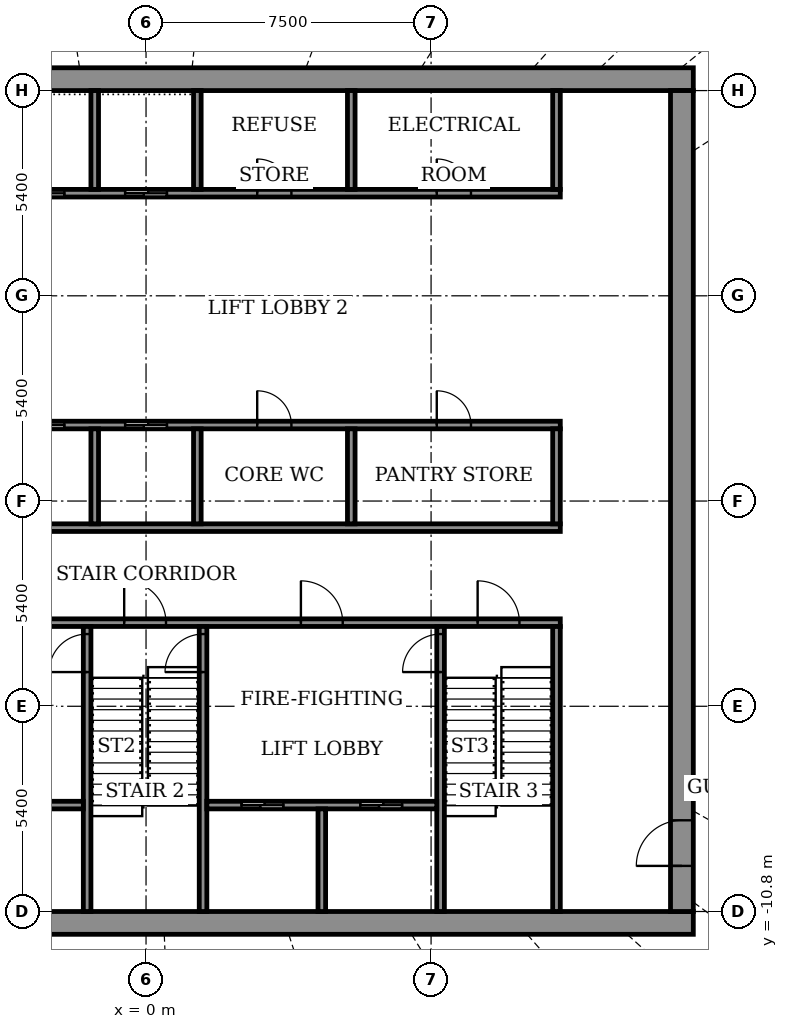
"""IFC4 building model, lengths in metres.
Left out: names, types, materials, properties, quantities, classifications, styles, units other than length and angle.
Written with IfcOpenShell. Run it as: python <this file> out.ifc"""

import sys

from ifc_helpers import new_model, si_unit, direction, frame, frame_2d, origin, place, context, subcontext, project, spatial, rectangle, extrude, element, fill, save


model = new_model("IFC4")
c1 = context("Model", 3, precision=1e-05, world=origin(), true_north=direction((0.0, 1.0)))
c2 = subcontext(c1, "Body", "Model", "MODEL_VIEW")
j1 = project(units=[si_unit("LENGTHUNIT", "METRE"), si_unit("PLANEANGLEUNIT", "RADIAN")], contexts=[c1])
p1 = place(None, origin())
s1 = spatial("IfcSite", under=j1, at=p1, CompositionType="ELEMENT")
p2 = place(p1, origin())
s2 = spatial("IfcBuilding", under=s1, at=p2, CompositionType="ELEMENT")
p3 = place(p2, frame((0.0, 0.0, 301.5)))
s3 = spatial("IfcBuildingStorey", under=s2, at=p3, CompositionType="ELEMENT", Elevation=301.5)
for number, where, z_axis, x_axis in (
    (1, (-14.4, -11.1, 0.0), (0.0, 0.0, 1.0), (1.0, 0.0, 0.0)),
    (2, (-14.4, 11.1, 0.0), (0.0, 0.0, 1.0), (1.0, 0.0, 0.0)),
):
    element("IfcWall", number, at=place(p3, frame(where, z_axis=z_axis, x_axis=x_axis)), inside=s3, PredefinedType="SHEAR", context=c2, shape_type="SweptSolid", body=[
        extrude(rectangle(XDim=28.8, YDim=0.6, at=frame_2d((14.4, 0.0))), origin(), (0.0, 0.0, 1.0), 4.6),
    ])
p4 = place(p3, frame((14.1, -10.8, 0.0), z_axis=(0.0, 0.0, 1.0), x_axis=(0.0, 1.0, 0.0)))
e3 = element("IfcWall", 3, at=p4, inside=s3, PredefinedType="SHEAR", context=c2, shape_type="SweptSolid", body=[
    extrude(rectangle(XDim=21.6, YDim=0.6, at=frame_2d((10.8, 0.0))), origin(), (0.0, 0.0, 1.0), 4.6),
])
p5 = place(p4, frame((1.2, 0.0, 0.0)))
e4 = element("IfcOpeningElement", 4, at=p5, cuts=e3, PredefinedType="OPENING", context=c2, shape_type="SweptSolid", body=[
    extrude(rectangle(XDim=1.2, YDim=2.1, at=frame_2d((0.6, 1.05))), frame((0.0, 0.31, 0.0), z_axis=(0.0, -1.0, 0.0), x_axis=(1.0, 0.0, 0.0)), (0.0, 0.0, 1.0), 0.62),
])
p6 = place(p3, frame((-10.9, -3.2, 0.0), z_axis=(0.0, 0.0, 1.0), x_axis=(1.0, 0.0, 0.0)))
e5 = element("IfcWall", 5, at=p6, inside=s3, PredefinedType="SHEAR", context=c2, shape_type="SweptSolid", body=[
    extrude(rectangle(XDim=21.8, YDim=0.2, at=frame_2d((10.9, 0.0))), origin(), (0.0, 0.0, 1.0), 4.05),
])
p7 = place(p6, frame((1.075, 0.0, 0.0)))
e6 = element("IfcOpeningElement", 6, at=p7, cuts=e5, PredefinedType="OPENING", context=c2, shape_type="SweptSolid", body=[
    extrude(rectangle(XDim=1.1, YDim=2.1, at=frame_2d((0.55, 1.05))), frame((0.0, 0.11, 0.0), z_axis=(0.0, -1.0, 0.0), x_axis=(1.0, 0.0, 0.0)), (0.0, 0.0, 1.0), 0.22),
])
p8 = place(p6, frame((10.325, 0.0, 0.0)))
e7 = element("IfcOpeningElement", 7, at=p8, cuts=e5, PredefinedType="OPENING", context=c2, shape_type="SweptSolid", body=[
    extrude(rectangle(XDim=1.1, YDim=2.1, at=frame_2d((0.55, 1.05))), frame((0.0, 0.11, 0.0), z_axis=(0.0, -1.0, 0.0), x_axis=(1.0, 0.0, 0.0)), (0.0, 0.0, 1.0), 0.22),
])
p9 = place(p6, frame((19.625, 0.0, 0.0)))
e8 = element("IfcOpeningElement", 8, at=p9, cuts=e5, PredefinedType="OPENING", context=c2, shape_type="SweptSolid", body=[
    extrude(rectangle(XDim=1.1, YDim=2.1, at=frame_2d((0.55, 1.05))), frame((0.0, 0.11, 0.0), z_axis=(0.0, -1.0, 0.0), x_axis=(1.0, 0.0, 0.0)), (0.0, 0.0, 1.0), 0.22),
])
p10 = place(p6, frame((5.7, 0.0, 0.0)))
e9 = element("IfcOpeningElement", 9, at=p10, cuts=e5, PredefinedType="OPENING", context=c2, shape_type="SweptSolid", body=[
    extrude(rectangle(XDim=1.1, YDim=2.1, at=frame_2d((0.55, 1.05))), frame((0.0, 0.11, 0.0), z_axis=(0.0, -1.0, 0.0), x_axis=(1.0, 0.0, 0.0)), (0.0, 0.0, 1.0), 0.22),
])
p11 = place(p6, frame((14.975, 0.0, 0.0)))
e10 = element("IfcOpeningElement", 10, at=p11, cuts=e5, PredefinedType="OPENING", context=c2, shape_type="SweptSolid", body=[
    extrude(rectangle(XDim=1.1, YDim=2.1, at=frame_2d((0.55, 1.05))), frame((0.0, 0.11, 0.0), z_axis=(0.0, -1.0, 0.0), x_axis=(1.0, 0.0, 0.0)), (0.0, 0.0, 1.0), 0.22),
])
p12 = place(p3, frame((-10.9, -0.7, 0.0), z_axis=(0.0, 0.0, 1.0), x_axis=(1.0, 0.0, 0.0)))
e11 = element("IfcWall", 11, at=p12, inside=s3, PredefinedType="SHEAR", context=c2, shape_type="SweptSolid", body=[
    extrude(rectangle(XDim=21.8, YDim=0.2, at=frame_2d((10.9, 0.0))), origin(), (0.0, 0.0, 1.0), 4.05),
])
p13 = place(p3, frame((-10.9, 2.0, 0.0), z_axis=(0.0, 0.0, 1.0), x_axis=(1.0, 0.0, 0.0)))
e12 = element("IfcWall", 12, at=p13, inside=s3, PredefinedType="SHEAR", context=c2, shape_type="SweptSolid", body=[
    extrude(rectangle(XDim=21.8, YDim=0.2, at=frame_2d((10.9, 0.0))), origin(), (0.0, 0.0, 1.0), 4.05),
])
p14 = place(p13, frame((4.95, 0.0, 0.0)))
e13 = element("IfcOpeningElement", 13, at=p14, cuts=e12, PredefinedType="OPENING", context=c2, shape_type="SweptSolid", body=[
    extrude(rectangle(XDim=1.1, YDim=2.1, at=frame_2d((0.55, 1.05))), frame((0.0, 0.11, 0.0), z_axis=(0.0, -1.0, 0.0), x_axis=(1.0, 0.0, 0.0)), (0.0, 0.0, 1.0), 0.22),
])
p15 = place(p13, frame((7.65, 0.0, 0.0)))
e14 = element("IfcOpeningElement", 14, at=p15, cuts=e12, PredefinedType="OPENING", context=c2, shape_type="SweptSolid", body=[
    extrude(rectangle(XDim=1.1, YDim=2.1, at=frame_2d((0.55, 1.05))), frame((0.0, 0.11, 0.0), z_axis=(0.0, -1.0, 0.0), x_axis=(1.0, 0.0, 0.0)), (0.0, 0.0, 1.0), 0.22),
])
p16 = place(p13, frame((10.35, 0.0, 0.0)))
e15 = element("IfcOpeningElement", 15, at=p16, cuts=e12, PredefinedType="OPENING", context=c2, shape_type="SweptSolid", body=[
    extrude(rectangle(XDim=1.1, YDim=2.1, at=frame_2d((0.55, 1.05))), frame((0.0, 0.11, 0.0), z_axis=(0.0, -1.0, 0.0), x_axis=(1.0, 0.0, 0.0)), (0.0, 0.0, 1.0), 0.22),
])
p17 = place(p13, frame((1.675, 0.0, 0.0)))
e16 = element("IfcOpeningElement", 16, at=p17, cuts=e12, PredefinedType="OPENING", context=c2, shape_type="SweptSolid", body=[
    extrude(rectangle(XDim=0.9, YDim=2.1, at=frame_2d((0.45, 1.05))), frame((0.0, 0.11, 0.0), z_axis=(0.0, -1.0, 0.0), x_axis=(1.0, 0.0, 0.0)), (0.0, 0.0, 1.0), 0.22),
])
p18 = place(p13, frame((13.825, 0.0, 0.0)))
e17 = element("IfcOpeningElement", 17, at=p18, cuts=e12, PredefinedType="OPENING", context=c2, shape_type="SweptSolid", body=[
    extrude(rectangle(XDim=0.9, YDim=2.1, at=frame_2d((0.45, 1.05))), frame((0.0, 0.11, 0.0), z_axis=(0.0, -1.0, 0.0), x_axis=(1.0, 0.0, 0.0)), (0.0, 0.0, 1.0), 0.22),
])
p19 = place(p13, frame((18.55, 0.0, 0.0)))
e18 = element("IfcOpeningElement", 18, at=p19, cuts=e12, PredefinedType="OPENING", context=c2, shape_type="SweptSolid", body=[
    extrude(rectangle(XDim=0.9, YDim=2.1, at=frame_2d((0.45, 1.05))), frame((0.0, 0.11, 0.0), z_axis=(0.0, -1.0, 0.0), x_axis=(1.0, 0.0, 0.0)), (0.0, 0.0, 1.0), 0.22),
])
p20 = place(p3, frame((-10.9, 8.1, 0.0), z_axis=(0.0, 0.0, 1.0), x_axis=(1.0, 0.0, 0.0)))
e19 = element("IfcWall", 19, at=p20, inside=s3, PredefinedType="SHEAR", context=c2, shape_type="SweptSolid", body=[
    extrude(rectangle(XDim=21.8, YDim=0.2, at=frame_2d((10.9, 0.0))), origin(), (0.0, 0.0, 1.0), 4.05),
])
p21 = place(p20, frame((4.95, 0.0, 0.0)))
e20 = element("IfcOpeningElement", 20, at=p21, cuts=e19, PredefinedType="OPENING", context=c2, shape_type="SweptSolid", body=[
    extrude(rectangle(XDim=1.1, YDim=2.1, at=frame_2d((0.55, 1.05))), frame((0.0, 0.11, 0.0), z_axis=(0.0, -1.0, 0.0), x_axis=(1.0, 0.0, 0.0)), (0.0, 0.0, 1.0), 0.22),
])
p22 = place(p20, frame((7.65, 0.0, 0.0)))
e21 = element("IfcOpeningElement", 21, at=p22, cuts=e19, PredefinedType="OPENING", context=c2, shape_type="SweptSolid", body=[
    extrude(rectangle(XDim=1.1, YDim=2.1, at=frame_2d((0.55, 1.05))), frame((0.0, 0.11, 0.0), z_axis=(0.0, -1.0, 0.0), x_axis=(1.0, 0.0, 0.0)), (0.0, 0.0, 1.0), 0.22),
])
p23 = place(p20, frame((10.35, 0.0, 0.0)))
e22 = element("IfcOpeningElement", 22, at=p23, cuts=e19, PredefinedType="OPENING", context=c2, shape_type="SweptSolid", body=[
    extrude(rectangle(XDim=1.1, YDim=2.1, at=frame_2d((0.55, 1.05))), frame((0.0, 0.11, 0.0), z_axis=(0.0, -1.0, 0.0), x_axis=(1.0, 0.0, 0.0)), (0.0, 0.0, 1.0), 0.22),
])
p24 = place(p20, frame((1.675, 0.0, 0.0)))
e23 = element("IfcOpeningElement", 23, at=p24, cuts=e19, PredefinedType="OPENING", context=c2, shape_type="SweptSolid", body=[
    extrude(rectangle(XDim=0.9, YDim=2.1, at=frame_2d((0.45, 1.05))), frame((0.0, 0.11, 0.0), z_axis=(0.0, -1.0, 0.0), x_axis=(1.0, 0.0, 0.0)), (0.0, 0.0, 1.0), 0.22),
])
p25 = place(p20, frame((13.825, 0.0, 0.0)))
e24 = element("IfcOpeningElement", 24, at=p25, cuts=e19, PredefinedType="OPENING", context=c2, shape_type="SweptSolid", body=[
    extrude(rectangle(XDim=0.9, YDim=2.1, at=frame_2d((0.45, 1.05))), frame((0.0, 0.11, 0.0), z_axis=(0.0, -1.0, 0.0), x_axis=(1.0, 0.0, 0.0)), (0.0, 0.0, 1.0), 0.22),
])
p26 = place(p20, frame((18.55, 0.0, 0.0)))
e25 = element("IfcOpeningElement", 25, at=p26, cuts=e19, PredefinedType="OPENING", context=c2, shape_type="SweptSolid", body=[
    extrude(rectangle(XDim=0.9, YDim=2.1, at=frame_2d((0.45, 1.05))), frame((0.0, 0.11, 0.0), z_axis=(0.0, -1.0, 0.0), x_axis=(1.0, 0.0, 0.0)), (0.0, 0.0, 1.0), 0.22),
])
p27 = place(p3, frame((-1.55, -10.8, 0.0), z_axis=(0.0, 0.0, 1.0), x_axis=(0.0, 1.0, 0.0)))
e26 = element("IfcWall", 26, at=p27, inside=s3, PredefinedType="SHEAR", context=c2, shape_type="SweptSolid", body=[
    extrude(rectangle(XDim=7.5, YDim=0.2, at=frame_2d((3.75, 0.0))), origin(), (0.0, 0.0, 1.0), 4.05),
])
p28 = place(p27, frame((6.3, 0.0, 0.0)))
e27 = element("IfcOpeningElement", 27, at=p28, cuts=e26, PredefinedType="OPENING", context=c2, shape_type="SweptSolid", body=[
    extrude(rectangle(XDim=1.0, YDim=2.1, at=frame_2d((0.5, 1.05))), frame((0.0, 0.11, 0.0), z_axis=(0.0, -1.0, 0.0), x_axis=(1.0, 0.0, 0.0)), (0.0, 0.0, 1.0), 0.22),
])
p29 = place(p3, frame((1.5, -10.8, 0.0), z_axis=(0.0, 0.0, 1.0), x_axis=(0.0, 1.0, 0.0)))
e28 = element("IfcWall", 28, at=p29, inside=s3, PredefinedType="SHEAR", context=c2, shape_type="SweptSolid", body=[
    extrude(rectangle(XDim=7.5, YDim=0.2, at=frame_2d((3.75, 0.0))), origin(), (0.0, 0.0, 1.0), 4.05),
])
p30 = place(p29, frame((6.3, 0.0, 0.0)))
e29 = element("IfcOpeningElement", 29, at=p30, cuts=e28, PredefinedType="OPENING", context=c2, shape_type="SweptSolid", body=[
    extrude(rectangle(XDim=1.0, YDim=2.1, at=frame_2d((0.5, 1.05))), frame((0.0, 0.11, 0.0), z_axis=(0.0, -1.0, 0.0), x_axis=(1.0, 0.0, 0.0)), (0.0, 0.0, 1.0), 0.22),
])
p31 = place(p3, frame((7.75, -10.8, 0.0), z_axis=(0.0, 0.0, 1.0), x_axis=(0.0, 1.0, 0.0)))
e30 = element("IfcWall", 30, at=p31, inside=s3, PredefinedType="SHEAR", context=c2, shape_type="SweptSolid", body=[
    extrude(rectangle(XDim=7.5, YDim=0.2, at=frame_2d((3.75, 0.0))), origin(), (0.0, 0.0, 1.0), 4.05),
])
p32 = place(p31, frame((6.3, 0.0, 0.0)))
e31 = element("IfcOpeningElement", 31, at=p32, cuts=e30, PredefinedType="OPENING", context=c2, shape_type="SweptSolid", body=[
    extrude(rectangle(XDim=1.0, YDim=2.1, at=frame_2d((0.5, 1.05))), frame((0.0, 0.11, 0.0), z_axis=(0.0, -1.0, 0.0), x_axis=(1.0, 0.0, 0.0)), (0.0, 0.0, 1.0), 0.22),
])
p33 = place(p3, frame((10.8, -10.8, 0.0), z_axis=(0.0, 0.0, 1.0), x_axis=(0.0, 1.0, 0.0)))
e32 = element("IfcWall", 32, at=p33, inside=s3, PredefinedType="SHEAR", context=c2, shape_type="SweptSolid", body=[
    extrude(rectangle(XDim=7.5, YDim=0.2, at=frame_2d((3.75, 0.0))), origin(), (0.0, 0.0, 1.0), 4.05),
])
p34 = place(p3, frame((-7.65, -8.0, 0.0), z_axis=(0.0, 0.0, 1.0), x_axis=(1.0, 0.0, 0.0)))
e33 = element("IfcWall", 33, at=p34, inside=s3, PredefinedType="SHEAR", context=c2, shape_type="SweptSolid", body=[
    extrude(rectangle(XDim=6.0, YDim=0.2, at=frame_2d((3.0, 0.0))), origin(), (0.0, 0.0, 1.0), 4.05),
])
p35 = place(p34, frame((0.9, 0.0, 0.0)))
e34 = element("IfcOpeningElement", 34, at=p35, cuts=e33, PredefinedType="OPENING", context=c2, shape_type="SweptSolid", body=[
    extrude(rectangle(XDim=1.1, YDim=2.1, at=frame_2d((0.55, 1.05))), frame((0.0, 0.11, 0.0), z_axis=(0.0, -1.0, 0.0), x_axis=(1.0, 0.0, 0.0)), (0.0, 0.0, 1.0), 0.22),
])
p36 = place(p34, frame((4.0, 0.0, 0.0)))
e35 = element("IfcOpeningElement", 35, at=p36, cuts=e33, PredefinedType="OPENING", context=c2, shape_type="SweptSolid", body=[
    extrude(rectangle(XDim=1.1, YDim=2.1, at=frame_2d((0.55, 1.05))), frame((0.0, 0.11, 0.0), z_axis=(0.0, -1.0, 0.0), x_axis=(1.0, 0.0, 0.0)), (0.0, 0.0, 1.0), 0.22),
])
p37 = place(p3, frame((1.6, -8.0, 0.0), z_axis=(0.0, 0.0, 1.0), x_axis=(1.0, 0.0, 0.0)))
e36 = element("IfcWall", 36, at=p37, inside=s3, PredefinedType="SHEAR", context=c2, shape_type="SweptSolid", body=[
    extrude(rectangle(XDim=6.05, YDim=0.2, at=frame_2d((3.025, 0.0))), origin(), (0.0, 0.0, 1.0), 4.05),
])
p38 = place(p37, frame((0.913, 0.0, 0.0)))
e37 = element("IfcOpeningElement", 37, at=p38, cuts=e36, PredefinedType="OPENING", context=c2, shape_type="SweptSolid", body=[
    extrude(rectangle(XDim=1.1, YDim=2.1, at=frame_2d((0.55, 1.05))), frame((0.0, 0.11, 0.0), z_axis=(0.0, -1.0, 0.0), x_axis=(1.0, 0.0, 0.0)), (0.0, 0.0, 1.0), 0.22),
])
p39 = place(p37, frame((4.038, 0.0, 0.0)))
e38 = element("IfcOpeningElement", 38, at=p39, cuts=e36, PredefinedType="OPENING", context=c2, shape_type="SweptSolid", body=[
    extrude(rectangle(XDim=1.1, YDim=2.1, at=frame_2d((0.55, 1.05))), frame((0.0, 0.11, 0.0), z_axis=(0.0, -1.0, 0.0), x_axis=(1.0, 0.0, 0.0)), (0.0, 0.0, 1.0), 0.22),
])
p40 = place(p3, frame((4.625, -10.8, 0.0), z_axis=(0.0, 0.0, 1.0), x_axis=(0.0, 1.0, 0.0)))
e39 = element("IfcWall", 39, at=p40, inside=s3, PredefinedType="SHEAR", context=c2, shape_type="SweptSolid", body=[
    extrude(rectangle(XDim=2.7, YDim=0.2, at=frame_2d((1.35, 0.0))), origin(), (0.0, 0.0, 1.0), 4.05),
])
for number, where, z_axis, x_axis in (
    (40, (-1.35, -0.6, 0.0), (0.0, 0.0, 1.0), (0.0, 1.0, 0.0)),
    (41, (1.35, -0.6, 0.0), (0.0, 0.0, 1.0), (0.0, 1.0, 0.0)),
):
    element("IfcWall", number, at=place(p3, frame(where, z_axis=z_axis, x_axis=x_axis)), inside=s3, PredefinedType="SHEAR", context=c2, shape_type="SweptSolid", body=[
        extrude(rectangle(XDim=2.5, YDim=0.2, at=frame_2d((1.25, 0.0))), origin(), (0.0, 0.0, 1.0), 4.05),
    ])
for number, where, z_axis, x_axis in (
    (42, (5.4, -0.6, 0.0), (0.0, 0.0, 1.0), (0.0, 1.0, 0.0)),
    (43, (10.8, -0.6, 0.0), (0.0, 0.0, 1.0), (0.0, 1.0, 0.0)),
):
    element("IfcWall", number, at=place(p3, frame(where, z_axis=z_axis, x_axis=x_axis)), inside=s3, PredefinedType="STANDARD", context=c2, shape_type="SweptSolid", body=[
        extrude(rectangle(XDim=2.5, YDim=0.2, at=frame_2d((1.25, 0.0))), origin(), (0.0, 0.0, 1.0), 4.05),
    ])
for number, where, z_axis, x_axis in (
    (44, (-1.35, 8.2, 0.0), (0.0, 0.0, 1.0), (0.0, 1.0, 0.0)),
    (45, (1.35, 8.2, 0.0), (0.0, 0.0, 1.0), (0.0, 1.0, 0.0)),
):
    element("IfcWall", number, at=place(p3, frame(where, z_axis=z_axis, x_axis=x_axis)), inside=s3, PredefinedType="SHEAR", context=c2, shape_type="SweptSolid", body=[
        extrude(rectangle(XDim=2.6, YDim=0.2, at=frame_2d((1.3, 0.0))), origin(), (0.0, 0.0, 1.0), 4.05),
    ])
for number, where, z_axis, x_axis in (
    (46, (5.4, 8.2, 0.0), (0.0, 0.0, 1.0), (0.0, 1.0, 0.0)),
    (47, (10.8, 8.2, 0.0), (0.0, 0.0, 1.0), (0.0, 1.0, 0.0)),
):
    element("IfcWall", number, at=place(p3, frame(where, z_axis=z_axis, x_axis=x_axis)), inside=s3, PredefinedType="STANDARD", context=c2, shape_type="SweptSolid", body=[
        extrude(rectangle(XDim=2.6, YDim=0.2, at=frame_2d((1.3, 0.0))), origin(), (0.0, 0.0, 1.0), 4.05),
    ])
p41 = place(p5, origin())
e48 = element("IfcDoor", 48, at=p41, inside=s3, OperationType="DOUBLE_DOOR_SINGLE_SWING", PredefinedType="DOOR", context=c2, shape_type="SweptSolid", body=[
    extrude(rectangle(XDim=1.2, YDim=2.1, at=frame_2d((0.6, 1.05))), frame((0.0, 0.025, 0.0), z_axis=(0.0, -1.0, 0.0), x_axis=(1.0, 0.0, 0.0)), (0.0, 0.0, 1.0), 0.05),
])
fill(e4, e48)
p42 = place(p15, origin())
e49 = element("IfcDoor", 49, at=p42, inside=s3, OperationType="SLIDING_TO_LEFT", PredefinedType="DOOR", context=c2, shape_type="SweptSolid", body=[
    extrude(rectangle(XDim=1.1, YDim=2.1, at=frame_2d((0.55, 1.05))), frame((0.0, 0.025, 0.0), z_axis=(0.0, -1.0, 0.0), x_axis=(1.0, 0.0, 0.0)), (0.0, 0.0, 1.0), 0.05),
])
fill(e14, e49)
p43 = place(p16, origin())
e50 = element("IfcDoor", 50, at=p43, inside=s3, OperationType="SLIDING_TO_LEFT", PredefinedType="DOOR", context=c2, shape_type="SweptSolid", body=[
    extrude(rectangle(XDim=1.1, YDim=2.1, at=frame_2d((0.55, 1.05))), frame((0.0, 0.025, 0.0), z_axis=(0.0, -1.0, 0.0), x_axis=(1.0, 0.0, 0.0)), (0.0, 0.0, 1.0), 0.05),
])
fill(e15, e50)
p44 = place(p22, origin())
e51 = element("IfcDoor", 51, at=p44, inside=s3, OperationType="SLIDING_TO_LEFT", PredefinedType="DOOR", context=c2, shape_type="SweptSolid", body=[
    extrude(rectangle(XDim=1.1, YDim=2.1, at=frame_2d((0.55, 1.05))), frame((0.0, 0.025, 0.0), z_axis=(0.0, -1.0, 0.0), x_axis=(1.0, 0.0, 0.0)), (0.0, 0.0, 1.0), 0.05),
])
fill(e21, e51)
p45 = place(p23, origin())
e52 = element("IfcDoor", 52, at=p45, inside=s3, OperationType="SLIDING_TO_LEFT", PredefinedType="DOOR", context=c2, shape_type="SweptSolid", body=[
    extrude(rectangle(XDim=1.1, YDim=2.1, at=frame_2d((0.55, 1.05))), frame((0.0, 0.025, 0.0), z_axis=(0.0, -1.0, 0.0), x_axis=(1.0, 0.0, 0.0)), (0.0, 0.0, 1.0), 0.05),
])
fill(e22, e52)
p46 = place(p18, origin())
e53 = element("IfcDoor", 53, at=p46, inside=s3, OperationType="SINGLE_SWING_RIGHT", PredefinedType="DOOR", context=c2, shape_type="SweptSolid", body=[
    extrude(rectangle(XDim=0.9, YDim=2.1, at=frame_2d((0.45, 1.05))), frame((0.0, 0.025, 0.0), z_axis=(0.0, -1.0, 0.0), x_axis=(1.0, 0.0, 0.0)), (0.0, 0.0, 1.0), 0.05),
])
fill(e17, e53)
p47 = place(p19, origin())
e54 = element("IfcDoor", 54, at=p47, inside=s3, OperationType="SINGLE_SWING_RIGHT", PredefinedType="DOOR", context=c2, shape_type="SweptSolid", body=[
    extrude(rectangle(XDim=0.9, YDim=2.1, at=frame_2d((0.45, 1.05))), frame((0.0, 0.025, 0.0), z_axis=(0.0, -1.0, 0.0), x_axis=(1.0, 0.0, 0.0)), (0.0, 0.0, 1.0), 0.05),
])
fill(e18, e54)
p48 = place(p25, origin())
e55 = element("IfcDoor", 55, at=p48, inside=s3, OperationType="SINGLE_SWING_RIGHT", PredefinedType="DOOR", context=c2, shape_type="SweptSolid", body=[
    extrude(rectangle(XDim=0.9, YDim=2.1, at=frame_2d((0.45, 1.05))), frame((0.0, 0.025, 0.0), z_axis=(0.0, -1.0, 0.0), x_axis=(1.0, 0.0, 0.0)), (0.0, 0.0, 1.0), 0.05),
])
fill(e24, e55)
p49 = place(p26, origin())
e56 = element("IfcDoor", 56, at=p49, inside=s3, OperationType="SINGLE_SWING_LEFT", PredefinedType="DOOR", context=c2, shape_type="SweptSolid", body=[
    extrude(rectangle(XDim=0.9, YDim=2.1, at=frame_2d((0.45, 1.05))), frame((0.0, 0.025, 0.0), z_axis=(0.0, -1.0, 0.0), x_axis=(1.0, 0.0, 0.0)), (0.0, 0.0, 1.0), 0.05),
])
fill(e25, e56)
p50 = place(p38, origin())
e57 = element("IfcDoor", 57, at=p50, inside=s3, OperationType="SLIDING_TO_LEFT", PredefinedType="DOOR", context=c2, shape_type="SweptSolid", body=[
    extrude(rectangle(XDim=1.1, YDim=2.1, at=frame_2d((0.55, 1.05))), frame((0.0, 0.025, 0.0), z_axis=(0.0, -1.0, 0.0), x_axis=(1.0, 0.0, 0.0)), (0.0, 0.0, 1.0), 0.05),
])
fill(e37, e57)
p51 = place(p39, origin())
e58 = element("IfcDoor", 58, at=p51, inside=s3, OperationType="SLIDING_TO_LEFT", PredefinedType="DOOR", context=c2, shape_type="SweptSolid", body=[
    extrude(rectangle(XDim=1.1, YDim=2.1, at=frame_2d((0.55, 1.05))), frame((0.0, 0.025, 0.0), z_axis=(0.0, -1.0, 0.0), x_axis=(1.0, 0.0, 0.0)), (0.0, 0.0, 1.0), 0.05),
])
fill(e38, e58)
p52 = place(p8, origin())
e59 = element("IfcDoor", 59, at=p52, inside=s3, OperationType="SINGLE_SWING_RIGHT", PredefinedType="DOOR", context=c2, shape_type="SweptSolid", body=[
    extrude(rectangle(XDim=1.1, YDim=2.1, at=frame_2d((0.55, 1.05))), frame((0.0, 0.025, 0.0), z_axis=(0.0, -1.0, 0.0), x_axis=(1.0, 0.0, 0.0)), (0.0, 0.0, 1.0), 0.05),
])
fill(e7, e59)
p53 = place(p9, origin())
e60 = element("IfcDoor", 60, at=p53, inside=s3, OperationType="SINGLE_SWING_RIGHT", PredefinedType="DOOR", context=c2, shape_type="SweptSolid", body=[
    extrude(rectangle(XDim=1.1, YDim=2.1, at=frame_2d((0.55, 1.05))), frame((0.0, 0.025, 0.0), z_axis=(0.0, -1.0, 0.0), x_axis=(1.0, 0.0, 0.0)), (0.0, 0.0, 1.0), 0.05),
])
fill(e8, e60)
p54 = place(p11, origin())
e61 = element("IfcDoor", 61, at=p54, inside=s3, OperationType="SINGLE_SWING_LEFT", PredefinedType="DOOR", context=c2, shape_type="SweptSolid", body=[
    extrude(rectangle(XDim=1.1, YDim=2.1, at=frame_2d((0.55, 1.05))), frame((0.0, 0.025, 0.0), z_axis=(0.0, -1.0, 0.0), x_axis=(1.0, 0.0, 0.0)), (0.0, 0.0, 1.0), 0.05),
])
fill(e10, e61)
p55 = place(p28, origin())
e62 = element("IfcDoor", 62, at=p55, inside=s3, OperationType="SINGLE_SWING_RIGHT", PredefinedType="DOOR", context=c2, shape_type="SweptSolid", body=[
    extrude(rectangle(XDim=1.0, YDim=2.1, at=frame_2d((0.5, 1.05))), frame((0.0, 0.025, 0.0), z_axis=(0.0, -1.0, 0.0), x_axis=(1.0, 0.0, 0.0)), (0.0, 0.0, 1.0), 0.05),
])
fill(e27, e62)
p56 = place(p30, origin())
e63 = element("IfcDoor", 63, at=p56, inside=s3, OperationType="SINGLE_SWING_RIGHT", PredefinedType="DOOR", context=c2, shape_type="SweptSolid", body=[
    extrude(rectangle(XDim=1.0, YDim=2.1, at=frame_2d((0.5, 1.05))), frame((0.0, 0.025, 0.0), z_axis=(0.0, -1.0, 0.0), x_axis=(1.0, 0.0, 0.0)), (0.0, 0.0, 1.0), 0.05),
])
fill(e29, e63)
p57 = place(p32, origin())
e64 = element("IfcDoor", 64, at=p57, inside=s3, OperationType="SINGLE_SWING_RIGHT", PredefinedType="DOOR", context=c2, shape_type="SweptSolid", body=[
    extrude(rectangle(XDim=1.0, YDim=2.1, at=frame_2d((0.5, 1.05))), frame((0.0, 0.025, 0.0), z_axis=(0.0, -1.0, 0.0), x_axis=(1.0, 0.0, 0.0)), (0.0, 0.0, 1.0), 0.05),
])
fill(e31, e64)
save(model, sys.argv[1])
